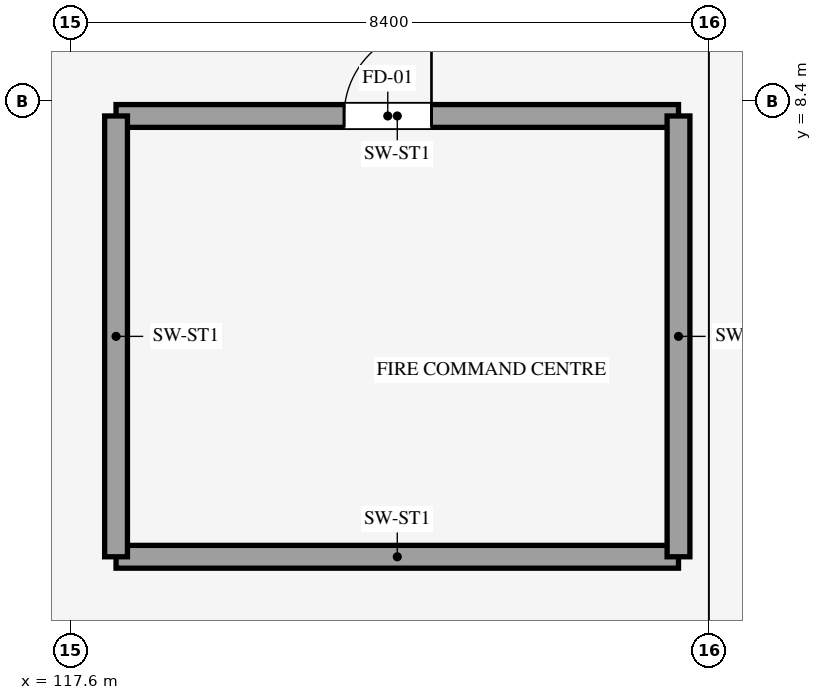
"""IFC4 building model, lengths in metres.
Left out: names, types, materials, properties, quantities, classifications, styles, units other than length and angle.
Written with IfcOpenShell. Run it as: python <this file> out.ifc"""

import sys

from ifc_helpers import new_model, si_unit, direction, frame, frame_2d, origin, place, context, subcontext, project, spatial, rectangle, extrude, element, fill, save


model = new_model("IFC4")
c1 = context("Model", 3, precision=1e-05, world=origin(), true_north=direction((0.0, 1.0)))
c2 = subcontext(c1, "Body", "Model", "MODEL_VIEW")
j1 = project(units=[si_unit("LENGTHUNIT", "METRE"), si_unit("PLANEANGLEUNIT", "RADIAN")], contexts=[c1])
p1 = place(None, origin())
s1 = spatial("IfcSite", under=j1, at=p1, CompositionType="ELEMENT")
p2 = place(p1, origin())
s2 = spatial("IfcBuilding", under=s1, at=p2, CompositionType="ELEMENT")
p3 = place(p2, origin())
s3 = spatial("IfcBuildingStorey", under=s2, at=p3, CompositionType="ELEMENT", Elevation=0.0)
p4 = place(p3, frame((118.2, 2.4, 0.0), z_axis=(0.0, 0.0, 1.0), x_axis=(1.0, 0.0, 0.0)))
e1 = element("IfcWall", 1, at=p4, inside=s3, PredefinedType="SHEAR", context=c2, shape_type="SweptSolid", body=[
    extrude(rectangle(XDim=7.4, YDim=0.3, at=frame_2d((3.7, 0.0))), origin(), (0.0, 0.0, 1.0), 4.55),
])
p5 = place(p3, frame((118.2, 8.2, 0.0), z_axis=(0.0, 0.0, 1.0), x_axis=(1.0, 0.0, 0.0)))
e2 = element("IfcWall", 2, at=p5, inside=s3, PredefinedType="SHEAR", context=c2, shape_type="SweptSolid", body=[
    extrude(rectangle(XDim=7.4, YDim=0.3, at=frame_2d((3.7, 0.0))), origin(), (0.0, 0.0, 1.0), 4.55),
])
p6 = place(p5, frame((3.0, 0.0, 0.0)))
e3 = element("IfcOpeningElement", 3, at=p6, cuts=e2, PredefinedType="OPENING", context=c2, shape_type="SweptSolid", body=[
    extrude(rectangle(XDim=1.15, YDim=2.15, at=frame_2d((0.575, 1.075))), frame((0.0, 0.16, 0.0), z_axis=(0.0, -1.0, 0.0), x_axis=(1.0, 0.0, 0.0)), (0.0, 0.0, 1.0), 0.32),
])
for number, where, z_axis, x_axis in (
    (4, (118.2, 2.4, 0.0), (0.0, 0.0, 1.0), (0.0, 1.0, 0.0)),
    (5, (125.6, 2.4, 0.0), (0.0, 0.0, 1.0), (0.0, 1.0, 0.0)),
):
    element("IfcWall", number, at=place(p3, frame(where, z_axis=z_axis, x_axis=x_axis)), inside=s3, PredefinedType="SHEAR", context=c2, shape_type="SweptSolid", body=[
        extrude(rectangle(XDim=5.8, YDim=0.3, at=frame_2d((2.9, 0.0))), origin(), (0.0, 0.0, 1.0), 4.55),
    ])
p7 = place(p6, origin())
e6 = element("IfcDoor", 6, at=p7, inside=s3, OperationType="SINGLE_SWING_RIGHT", PredefinedType="DOOR", context=c2, shape_type="SweptSolid", body=[
    extrude(rectangle(XDim=1.15, YDim=2.15, at=frame_2d((0.575, 1.075))), frame((0.0, 0.025, 0.0), z_axis=(0.0, -1.0, 0.0), x_axis=(1.0, 0.0, 0.0)), (0.0, 0.0, 1.0), 0.05),
])
fill(e3, e6)
save(model, sys.argv[1])
